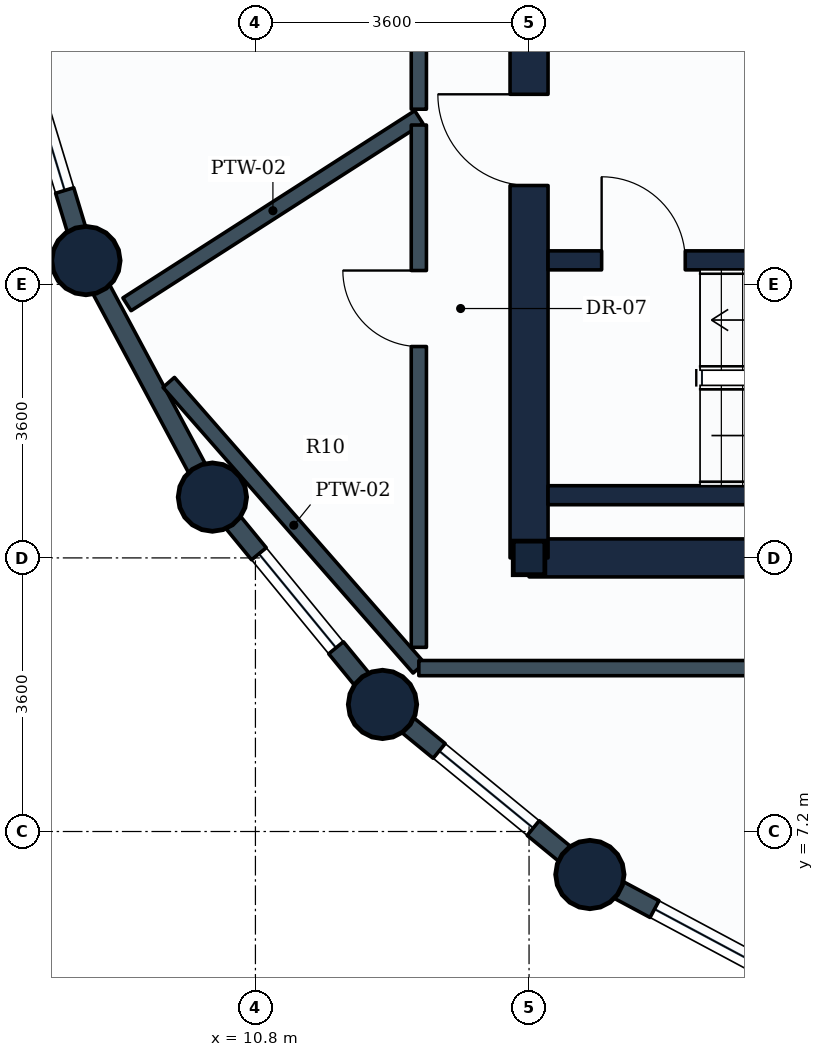
"""IFC4 building model, lengths in metres.
Left out: names, types, materials, properties, quantities, classifications, styles, units other than length and angle.
Written with IfcOpenShell. Run it as: python <this file> out.ifc"""

import sys

from ifc_helpers import new_model, si_unit, direction, frame, frame_2d, origin, origin_2d, place, context, subcontext, project, spatial, rectangle, circle, i_section, extrude, element, fill, save


model = new_model("IFC4")
c1 = context("Model", 3, precision=1e-05, world=origin(), true_north=direction((0.0, 1.0)))
c2 = subcontext(c1, "Body", "Model", "MODEL_VIEW")
j1 = project(units=[si_unit("LENGTHUNIT", "METRE"), si_unit("PLANEANGLEUNIT", "RADIAN")], contexts=[c1])
p1 = place(None, origin())
s1 = spatial("IfcSite", under=j1, at=p1, CompositionType="ELEMENT")
p2 = place(p1, origin())
s2 = spatial("IfcBuilding", under=s1, at=p2, CompositionType="ELEMENT")
p3 = place(p2, frame((0.0, 0.0, 186.2)))
s3 = spatial("IfcBuildingStorey", under=s2, at=p3, CompositionType="ELEMENT", Elevation=186.2)
for number, where, z_axis, x_axis in (
    (1, (8.57, 14.712, 0.0), (0.0, 0.0, 1.0), (1.0, 0.0, 0.0)),
    (2, (10.234, 11.6, 0.0), (0.0, 0.0, 1.0), (1.0, 0.0, 0.0)),
    (3, (12.472, 8.872, 0.0), (0.0, 0.0, 1.0), (1.0, 0.0, 0.0)),
):
    element("IfcColumn", number, at=place(p3, frame(where, z_axis=z_axis, x_axis=x_axis)), inside=s3, PredefinedType="COLUMN", context=c2, shape_type="SweptSolid", body=[
        extrude(circle(Radius=0.45, at=origin_2d()), origin(), (0.0, 0.0, 1.0), 3.8),
    ])
p4 = place(p3, frame((14.4, 10.8, 0.0), z_axis=(0.0, 0.0, 1.0), x_axis=(1.0, 0.0, 0.0)))
e4 = element("IfcColumn", 4, at=p4, inside=s3, PredefinedType="COLUMN", context=c2, shape_type="SweptSolid", body=[
    extrude(i_section(OverallWidth=0.416, OverallDepth=0.442, WebThickness=0.025, FlangeThickness=0.041, FilletRadius=0.015, at=origin_2d()), origin(), (0.0, 0.0, 1.0), 3.8),
])
p5 = place(p3, frame((15.2, 6.634, 0.0), z_axis=(0.0, 0.0, 1.0), x_axis=(1.0, 0.0, 0.0)))
e5 = element("IfcColumn", 5, at=p5, inside=s3, PredefinedType="COLUMN", context=c2, shape_type="SweptSolid", body=[
    extrude(circle(Radius=0.45, at=origin_2d()), origin(), (0.0, 0.0, 1.0), 3.8),
])
p6 = place(p3, frame((8.57, 14.712, 0.0), z_axis=(0.0, 0.0, 1.0), x_axis=(-0.290305086481, 0.956934144423, 0.0)))
e6 = element("IfcWall", 6, at=p6, inside=s3, PredefinedType="STANDARD", context=c2, shape_type="SweptSolid", body=[
    extrude(rectangle(XDim=3.528, YDim=0.25, at=frame_2d((1.764, 0.0))), origin(), (0.0, 0.0, 1.0), 2.93),
])
p7 = place(p6, frame((0.964, 0.0, 0.85)))
e7 = element("IfcOpeningElement", 7, at=p7, cuts=e6, PredefinedType="OPENING", context=c2, shape_type="SweptSolid", body=[
    extrude(rectangle(XDim=1.6, YDim=1.35, at=frame_2d((0.8, 0.675))), frame((0.0, 0.135, 0.0), z_axis=(0.0, -1.0, 0.0), x_axis=(1.0, 0.0, 0.0)), (0.0, 0.0, 1.0), 0.27),
])
p8 = place(p3, frame((10.234, 11.6, 0.0), z_axis=(0.0, 0.0, 1.0), x_axis=(-0.47151087309, 0.881860247748, 0.0)))
e8 = element("IfcWall", 8, at=p8, inside=s3, PredefinedType="STANDARD", context=c2, shape_type="SweptSolid", body=[
    extrude(rectangle(XDim=3.529, YDim=0.25, at=frame_2d((1.764, 0.0))), origin(), (0.0, 0.0, 1.0), 2.93),
])
p9 = place(p3, frame((12.472, 8.872, 0.0), z_axis=(0.0, 0.0, 1.0), x_axis=(-0.634258295121, 0.773121216285, 0.0)))
e9 = element("IfcWall", 9, at=p9, inside=s3, PredefinedType="STANDARD", context=c2, shape_type="SweptSolid", body=[
    extrude(rectangle(XDim=3.529, YDim=0.25, at=frame_2d((1.764, 0.0))), origin(), (0.0, 0.0, 1.0), 2.93),
])
p10 = place(p9, frame((0.964, 0.0, 0.85)))
e10 = element("IfcOpeningElement", 10, at=p10, cuts=e9, PredefinedType="OPENING", context=c2, shape_type="SweptSolid", body=[
    extrude(rectangle(XDim=1.6, YDim=1.35, at=frame_2d((0.8, 0.675))), frame((0.0, 0.135, 0.0), z_axis=(0.0, -1.0, 0.0), x_axis=(1.0, 0.0, 0.0)), (0.0, 0.0, 1.0), 0.27),
])
p11 = place(p3, frame((15.2, 6.634, 0.0), z_axis=(0.0, 0.0, 1.0), x_axis=(-0.773121216285, 0.634258295121, 0.0)))
e11 = element("IfcWall", 11, at=p11, inside=s3, PredefinedType="STANDARD", context=c2, shape_type="SweptSolid", body=[
    extrude(rectangle(XDim=3.529, YDim=0.25, at=frame_2d((1.764, 0.0))), origin(), (0.0, 0.0, 1.0), 2.93),
])
p12 = place(p11, frame((0.964, 0.0, 0.85)))
e12 = element("IfcOpeningElement", 12, at=p12, cuts=e11, PredefinedType="OPENING", context=c2, shape_type="SweptSolid", body=[
    extrude(rectangle(XDim=1.6, YDim=1.35, at=frame_2d((0.8, 0.675))), frame((0.0, 0.135, 0.0), z_axis=(0.0, -1.0, 0.0), x_axis=(1.0, 0.0, 0.0)), (0.0, 0.0, 1.0), 0.27),
])
p13 = place(p3, frame((18.312, 4.97, 0.0), z_axis=(0.0, 0.0, 1.0), x_axis=(-0.881846862014, 0.471535907389, 0.0)))
e13 = element("IfcWall", 13, at=p13, inside=s3, PredefinedType="STANDARD", context=c2, shape_type="SweptSolid", body=[
    extrude(rectangle(XDim=3.529, YDim=0.25, at=frame_2d((1.765, 0.0))), origin(), (0.0, 0.0, 1.0), 2.93),
])
p14 = place(p13, frame((0.964, 0.0, 0.85)))
e14 = element("IfcOpeningElement", 14, at=p14, cuts=e13, PredefinedType="OPENING", context=c2, shape_type="SweptSolid", body=[
    extrude(rectangle(XDim=1.6, YDim=1.35, at=frame_2d((0.8, 0.675))), frame((0.0, 0.135, 0.0), z_axis=(0.0, -1.0, 0.0), x_axis=(1.0, 0.0, 0.0)), (0.0, 0.0, 1.0), 0.27),
])
p15 = place(p3, frame((14.4, 10.8, 0.0), z_axis=(0.0, 0.0, 1.0), x_axis=(1.0, 0.0, 0.0)))
e15 = element("IfcWall", 15, at=p15, inside=s3, PredefinedType="SHEAR", context=c2, shape_type="SweptSolid", body=[
    extrude(rectangle(XDim=18.0, YDim=0.5, at=frame_2d((9.0, 0.0))), origin(), (0.0, 0.0, 1.0), 3.55),
])
p16 = place(p3, frame((14.4, 10.8, 0.0), z_axis=(0.0, 0.0, 1.0), x_axis=(0.0, 1.0, 0.0)))
e16 = element("IfcWall", 16, at=p16, inside=s3, PredefinedType="SHEAR", context=c2, shape_type="SweptSolid", body=[
    extrude(rectangle(XDim=14.4, YDim=0.5, at=frame_2d((7.2, 0.0))), origin(), (0.0, 0.0, 1.0), 3.55),
])
p17 = place(p16, frame((11.05, 0.0, 0.0)))
e17 = element("IfcOpeningElement", 17, at=p17, cuts=e16, PredefinedType="OPENING", context=c2, shape_type="SweptSolid", body=[
    extrude(rectangle(XDim=1.1, YDim=2.1, at=frame_2d((0.55, 1.05))), frame((0.0, 0.26, 0.0), z_axis=(0.0, -1.0, 0.0), x_axis=(1.0, 0.0, 0.0)), (0.0, 0.0, 1.0), 0.52),
])
p18 = place(p16, frame((4.9, 0.0, 0.0)))
e18 = element("IfcOpeningElement", 18, at=p18, cuts=e16, PredefinedType="OPENING", context=c2, shape_type="SweptSolid", body=[
    extrude(rectangle(XDim=1.2, YDim=2.1, at=frame_2d((0.6, 1.05))), frame((0.0, 0.26, 0.0), z_axis=(0.0, -1.0, 0.0), x_axis=(1.0, 0.0, 0.0)), (0.0, 0.0, 1.0), 0.52),
])
p19 = place(p16, frame((7.5, 0.0, 0.0)))
e19 = element("IfcOpeningElement", 19, at=p19, cuts=e16, PredefinedType="OPENING", context=c2, shape_type="SweptSolid", body=[
    extrude(rectangle(XDim=0.85, YDim=2.1, at=frame_2d((0.425, 1.05))), frame((0.0, 0.26, 0.0), z_axis=(0.0, -1.0, 0.0), x_axis=(1.0, 0.0, 0.0)), (0.0, 0.0, 1.0), 0.52),
])
p20 = place(p3, frame((14.65, 11.625, 0.0), z_axis=(0.0, 0.0, 1.0), x_axis=(1.0, 0.0, 0.0)))
e20 = element("IfcWall", 20, at=p20, inside=s3, PredefinedType="SHEAR", context=c2, shape_type="SweptSolid", body=[
    extrude(rectangle(XDim=8.7, YDim=0.25, at=frame_2d((4.35, 0.0))), origin(), (0.0, 0.0, 1.0), 3.55),
])
p21 = place(p3, frame((14.65, 14.715, 0.0), z_axis=(0.0, 0.0, 1.0), x_axis=(1.0, 0.0, 0.0)))
e21 = element("IfcWall", 21, at=p21, inside=s3, PredefinedType="SHEAR", context=c2, shape_type="SweptSolid", body=[
    extrude(rectangle(XDim=8.7, YDim=0.25, at=frame_2d((4.35, 0.0))), origin(), (0.0, 0.0, 1.0), 3.55),
])
p22 = place(p21, frame((0.705, 0.0, 0.0)))
e22 = element("IfcOpeningElement", 22, at=p22, cuts=e21, PredefinedType="OPENING", context=c2, shape_type="SweptSolid", body=[
    extrude(rectangle(XDim=1.1, YDim=2.1, at=frame_2d((0.55, 1.05))), frame((0.0, 0.135, 0.0), z_axis=(0.0, -1.0, 0.0), x_axis=(1.0, 0.0, 0.0)), (0.0, 0.0, 1.0), 0.27),
])
p23 = place(p3, frame((12.95, 9.35, 0.0), z_axis=(0.0, 0.0, 1.0), x_axis=(-0.658639514157, 0.752458630352, 0.0)))
e23 = element("IfcWall", 23, at=p23, inside=s3, PredefinedType="PARTITIONING", context=c2, shape_type="SweptSolid", body=[
    extrude(rectangle(XDim=4.996, YDim=0.2, at=frame_2d((2.498, 0.0))), origin(), (0.0, 0.0, 1.0), 2.93),
])
p24 = place(p3, frame((12.95, 16.6, 0.0), z_axis=(0.0, 0.0, 1.0), x_axis=(-0.841685822078, -0.539967570242, 0.0)))
e24 = element("IfcWall", 24, at=p24, inside=s3, PredefinedType="PARTITIONING", context=c2, shape_type="SweptSolid", body=[
    extrude(rectangle(XDim=4.562, YDim=0.2, at=frame_2d((2.281, 0.0))), origin(), (0.0, 0.0, 1.0), 2.93),
])
p25 = place(p3, frame((12.95, 16.704, 0.0), z_axis=(0.0, 0.0, 1.0), x_axis=(0.0, 1.0, 0.0)))
e25 = element("IfcWall", 25, at=p25, inside=s3, PredefinedType="PARTITIONING", context=c2, shape_type="SweptSolid", body=[
    extrude(rectangle(XDim=8.417, YDim=0.2, at=frame_2d((4.208, 0.0))), origin(), (0.0, 0.0, 1.0), 3.22),
])
p26 = place(p25, frame((3.696, 0.0, 0.0)))
e26 = element("IfcOpeningElement", 26, at=p26, cuts=e25, PredefinedType="OPENING", context=c2, shape_type="SweptSolid", body=[
    extrude(rectangle(XDim=1.0, YDim=2.1, at=frame_2d((0.5, 1.05))), frame((0.0, 0.11, 0.0), z_axis=(0.0, -1.0, 0.0), x_axis=(1.0, 0.0, 0.0)), (0.0, 0.0, 1.0), 0.22),
])
p27 = place(p3, frame((12.95, 9.623, 0.0), z_axis=(0.0, 0.0, 1.0), x_axis=(0.0, 1.0, 0.0)))
e27 = element("IfcWall", 27, at=p27, inside=s3, PredefinedType="PARTITIONING", context=c2, shape_type="SweptSolid", body=[
    extrude(rectangle(XDim=6.873, YDim=0.2, at=frame_2d((3.437, 0.0))), origin(), (0.0, 0.0, 1.0), 3.17),
])
p28 = place(p27, frame((3.958, 0.0, 0.0)))
e28 = element("IfcOpeningElement", 28, at=p28, cuts=e27, PredefinedType="OPENING", context=c2, shape_type="SweptSolid", body=[
    extrude(rectangle(XDim=1.0, YDim=2.1, at=frame_2d((0.5, 1.05))), frame((0.0, 0.11, 0.0), z_axis=(0.0, -1.0, 0.0), x_axis=(1.0, 0.0, 0.0)), (0.0, 0.0, 1.0), 0.22),
])
p29 = place(p3, frame((12.95, 9.35, 0.0), z_axis=(0.0, 0.0, 1.0), x_axis=(1.0, 0.0, 0.0)))
e29 = element("IfcWall", 29, at=p29, inside=s3, PredefinedType="PARTITIONING", context=c2, shape_type="SweptSolid", body=[
    extrude(rectangle(XDim=15.771, YDim=0.2, at=frame_2d((7.885, 0.0))), origin(), (0.0, 0.0, 1.0), 3.17),
])
p30 = place(p29, frame((4.836, 0.0, 0.0)))
e30 = element("IfcOpeningElement", 30, at=p30, cuts=e29, PredefinedType="OPENING", context=c2, shape_type="SweptSolid", body=[
    extrude(rectangle(XDim=1.0, YDim=2.1, at=frame_2d((0.5, 1.05))), frame((0.0, 0.11, 0.0), z_axis=(0.0, -1.0, 0.0), x_axis=(1.0, 0.0, 0.0)), (0.0, 0.0, 1.0), 0.22),
])
p31 = place(p7, origin())
e31 = element("IfcWindow", 31, at=p31, inside=s3, PartitioningType="SINGLE_PANEL", PredefinedType="WINDOW", context=c2, shape_type="SweptSolid", body=[
    extrude(rectangle(XDim=1.6, YDim=1.35, at=frame_2d((0.8, 0.675))), frame((0.0, 0.03, 0.0), z_axis=(0.0, -1.0, 0.0), x_axis=(1.0, 0.0, 0.0)), (0.0, 0.0, 1.0), 0.06),
])
fill(e7, e31)
p32 = place(p10, origin())
e32 = element("IfcWindow", 32, at=p32, inside=s3, PartitioningType="SINGLE_PANEL", PredefinedType="WINDOW", context=c2, shape_type="SweptSolid", body=[
    extrude(rectangle(XDim=1.6, YDim=1.35, at=frame_2d((0.8, 0.675))), frame((0.0, 0.03, 0.0), z_axis=(0.0, -1.0, 0.0), x_axis=(1.0, 0.0, 0.0)), (0.0, 0.0, 1.0), 0.06),
])
fill(e10, e32)
p33 = place(p12, origin())
e33 = element("IfcWindow", 33, at=p33, inside=s3, PartitioningType="SINGLE_PANEL", PredefinedType="WINDOW", context=c2, shape_type="SweptSolid", body=[
    extrude(rectangle(XDim=1.6, YDim=1.35, at=frame_2d((0.8, 0.675))), frame((0.0, 0.03, 0.0), z_axis=(0.0, -1.0, 0.0), x_axis=(1.0, 0.0, 0.0)), (0.0, 0.0, 1.0), 0.06),
])
fill(e12, e33)
p34 = place(p14, origin())
e34 = element("IfcWindow", 34, at=p34, inside=s3, PartitioningType="SINGLE_PANEL", PredefinedType="WINDOW", context=c2, shape_type="SweptSolid", body=[
    extrude(rectangle(XDim=1.6, YDim=1.35, at=frame_2d((0.8, 0.675))), frame((0.0, 0.03, 0.0), z_axis=(0.0, -1.0, 0.0), x_axis=(1.0, 0.0, 0.0)), (0.0, 0.0, 1.0), 0.06),
])
fill(e14, e34)
p35 = place(p22, origin())
e35 = element("IfcDoor", 35, at=p35, inside=s3, OperationType="SINGLE_SWING_LEFT", PredefinedType="DOOR", context=c2, shape_type="SweptSolid", body=[
    extrude(rectangle(XDim=1.1, YDim=2.1, at=frame_2d((0.55, 1.05))), frame((0.0, 0.025, 0.0), z_axis=(0.0, -1.0, 0.0), x_axis=(1.0, 0.0, 0.0)), (0.0, 0.0, 1.0), 0.05),
])
fill(e22, e35)
p36 = place(p18, origin())
e36 = element("IfcDoor", 36, at=p36, inside=s3, OperationType="SINGLE_SWING_RIGHT", PredefinedType="DOOR", context=c2, shape_type="SweptSolid", body=[
    extrude(rectangle(XDim=1.2, YDim=2.1, at=frame_2d((0.6, 1.05))), frame((0.0, 0.025, 0.0), z_axis=(0.0, -1.0, 0.0), x_axis=(1.0, 0.0, 0.0)), (0.0, 0.0, 1.0), 0.05),
])
fill(e18, e36)
p37 = place(p28, origin())
e37 = element("IfcDoor", 37, at=p37, inside=s3, OperationType="SINGLE_SWING_RIGHT", PredefinedType="DOOR", context=c2, shape_type="SweptSolid", body=[
    extrude(rectangle(XDim=1.0, YDim=2.1, at=frame_2d((0.5, 1.05))), frame((0.0, 0.025, 0.0), z_axis=(0.0, -1.0, 0.0), x_axis=(1.0, 0.0, 0.0)), (0.0, 0.0, 1.0), 0.05),
])
fill(e28, e37)
save(model, sys.argv[1])
